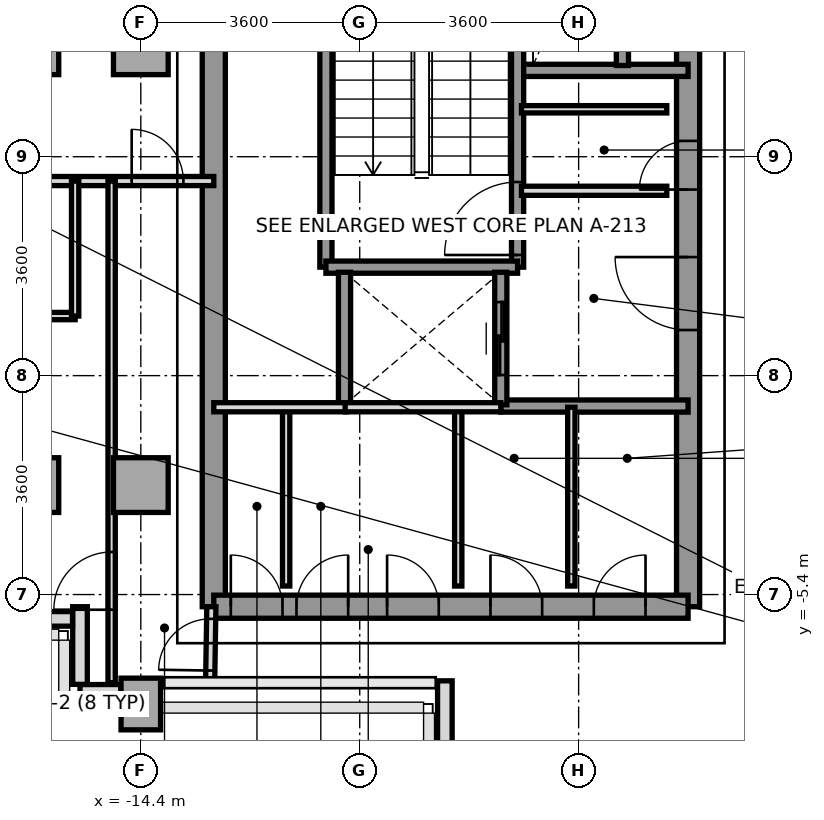
"""IFC4 building model, lengths in metres.
Left out: names, types, materials, properties, quantities, classifications, styles, units other than length and angle.
Written with IfcOpenShell. Run it as: python <this file> out.ifc"""

import sys

from ifc_helpers import new_model, si_unit, direction, frame, frame_2d, origin, origin_2d, place, context, subcontext, project, spatial, rectangle, extrude, source, transform, mapped, element, fill, save


model = new_model("IFC4")
c1 = context("Model", 3, precision=1e-05, world=origin(), true_north=direction((0.0, 1.0)))
c2 = subcontext(c1, "Body", "Model", "MODEL_VIEW")
j1 = project(units=[si_unit("LENGTHUNIT", "METRE"), si_unit("PLANEANGLEUNIT", "RADIAN")], contexts=[c1])
p1 = place(None, origin())
s1 = spatial("IfcSite", under=j1, at=p1, CompositionType="ELEMENT")
p2 = place(p1, origin())
s2 = spatial("IfcBuilding", under=s1, at=p2, CompositionType="ELEMENT")
p3 = place(p2, frame((0.0, 0.0, 187.6)))
s3 = spatial("IfcBuildingStorey", under=s2, at=p3, CompositionType="ELEMENT", Elevation=187.6)
m1 = source(origin(), c2, "Body", "SweptSolid", [
    extrude(rectangle(XDim=0.9, YDim=0.9, at=origin_2d()), origin(), (0.0, 0.0, 1.0), 3.2),
])
for number, where, z_axis, x_axis in (
    (1, (-16.2, -3.6, 0.0), (0.0, 0.0, 1.0), (1.0, 0.0, 0.0)),
    (2, (-16.2, 3.6, 0.0), (0.0, 0.0, 1.0), (1.0, 0.0, 0.0)),
):
    element("IfcColumn", number, at=place(p3, frame(where, z_axis=z_axis, x_axis=x_axis)), inside=s3, PredefinedType="COLUMN", context=c2, shape_type="MappedRepresentation", body=[
        mapped(m1, transform((0.0, 0.0, 0.0), x_axis=(1.0, 0.0, 0.0), y_axis=(0.0, 1.0, 0.0), z_axis=(0.0, 0.0, 1.0), scale=1.0)),
    ])
m2 = source(origin(), c2, "Body", "SweptSolid", [
    extrude(rectangle(XDim=0.65, YDim=0.85, at=origin_2d()), origin(), (0.0, 0.0, 1.0), 3.2),
])
p4 = place(p3, frame((-14.4, -7.2, 0.0), z_axis=(0.0, 0.0, 1.0), x_axis=(1.0, 0.0, 0.0)))
e3 = element("IfcColumn", 3, at=p4, inside=s3, PredefinedType="COLUMN", context=c2, shape_type="MappedRepresentation", body=[
    mapped(m2, transform((0.0, 0.0, 0.0), x_axis=(1.0, 0.0, 0.0), y_axis=(0.0, 1.0, 0.0), z_axis=(0.0, 0.0, 1.0), scale=1.0)),
])
for number, where, z_axis, x_axis in (
    (4, (-14.4, -3.6, 0.0), (0.0, 0.0, 1.0), (1.0, 0.0, 0.0)),
    (5, (-14.4, 3.6, 0.0), (0.0, 0.0, 1.0), (1.0, 0.0, 0.0)),
):
    element("IfcColumn", number, at=place(p3, frame(where, z_axis=z_axis, x_axis=x_axis)), inside=s3, PredefinedType="COLUMN", context=c2, shape_type="MappedRepresentation", body=[
        mapped(m1, transform((0.0, 0.0, 0.0), x_axis=(1.0, 0.0, 0.0), y_axis=(0.0, 1.0, 0.0), z_axis=(0.0, 0.0, 1.0), scale=1.0)),
    ])
p5 = place(p3, frame((-9.4, -8.547, 0.0), z_axis=(0.0, 0.0, 1.0), x_axis=(0.0, 1.0, 0.0)))
e6 = element("IfcWall", 6, at=p5, inside=s3, PredefinedType="PARAPET", context=c2, shape_type="SweptSolid", body=[
    extrude(rectangle(XDim=1.728, YDim=0.24, at=frame_2d((0.864, 0.0))), origin(), (0.0, 0.0, 1.0), 1.15),
])
p6 = place(p3, frame((-14.728, -7.0, 0.0), z_axis=(0.0, 0.0, 1.0), x_axis=(-1.0, 0.0, 0.0)))
e7 = element("IfcWall", 7, at=p6, inside=s3, PredefinedType="PARAPET", context=c2, shape_type="SweptSolid", body=[
    extrude(rectangle(XDim=0.672, YDim=0.24, at=frame_2d((0.336, 0.0))), origin(), (0.0, 0.0, 1.0), 1.15),
])
p7 = place(p3, frame((-15.4, -6.877, 0.0), z_axis=(0.0, 0.0, 1.0), x_axis=(0.0, 1.0, 0.0)))
e8 = element("IfcWall", 8, at=p7, inside=s3, PredefinedType="PARAPET", context=c2, shape_type="SweptSolid", body=[
    extrude(rectangle(XDim=1.277, YDim=0.24, at=frame_2d((0.638, 0.0))), origin(), (0.0, 0.0, 1.0), 1.15),
])
p8 = place(p3, frame((-15.523, -5.8, 0.0), z_axis=(0.0, 0.0, 1.0), x_axis=(-1.0, 0.0, 0.0)))
e9 = element("IfcWall", 9, at=p8, inside=s3, PredefinedType="PARAPET", context=c2, shape_type="SweptSolid", body=[
    extrude(rectangle(XDim=0.614, YDim=0.24, at=frame_2d((0.307, 0.0))), origin(), (0.0, 0.0, 1.0), 1.15),
])
p9 = place(p3, frame((-13.2, -5.6, 0.0), z_axis=(0.0, 0.0, 1.0), x_axis=(0.0, 1.0, 0.0)))
e10 = element("IfcWall", 10, at=p9, inside=s3, PredefinedType="SHEAR", context=c2, shape_type="SweptSolid", body=[
    extrude(rectangle(XDim=11.2, YDim=0.38, at=frame_2d((5.6, 0.0))), origin(), (0.0, 0.0, 1.0), 3.2),
])
p10 = place(p3, frame((-5.4, -5.6, 0.0), z_axis=(0.0, 0.0, 1.0), x_axis=(0.0, 1.0, 0.0)))
e11 = element("IfcWall", 11, at=p10, inside=s3, PredefinedType="SHEAR", context=c2, shape_type="SweptSolid", body=[
    extrude(rectangle(XDim=12.5, YDim=0.38, at=frame_2d((6.25, 0.0))), origin(), (0.0, 0.0, 1.0), 3.2),
])
p11 = place(p10, frame((4.55, 0.0, 0.0)))
e12 = element("IfcOpeningElement", 12, at=p11, cuts=e11, PredefinedType="OPENING", context=c2, shape_type="SweptSolid", body=[
    extrude(rectangle(XDim=1.2, YDim=2.2, at=frame_2d((0.6, 1.1))), frame((0.0, 0.2, 0.0), z_axis=(0.0, -1.0, 0.0), x_axis=(1.0, 0.0, 0.0)), (0.0, 0.0, 1.0), 0.4),
])
p12 = place(p10, frame((10.45, 0.0, 0.0)))
e13 = element("IfcOpeningElement", 13, at=p12, cuts=e11, PredefinedType="OPENING", context=c2, shape_type="SweptSolid", body=[
    extrude(rectangle(XDim=1.2, YDim=2.2, at=frame_2d((0.6, 1.1))), frame((0.0, 0.2, 0.0), z_axis=(0.0, -1.0, 0.0), x_axis=(1.0, 0.0, 0.0)), (0.0, 0.0, 1.0), 0.4),
])
p13 = place(p10, frame((6.86, 0.0, 0.0)))
e14 = element("IfcOpeningElement", 14, at=p13, cuts=e11, PredefinedType="OPENING", context=c2, shape_type="SweptSolid", body=[
    extrude(rectangle(XDim=0.8, YDim=2.1, at=frame_2d((0.4, 1.05))), frame((0.0, 0.2, 0.0), z_axis=(0.0, -1.0, 0.0), x_axis=(1.0, 0.0, 0.0)), (0.0, 0.0, 1.0), 0.4),
])
p14 = place(p3, frame((-13.2, -5.6, 0.0), z_axis=(0.0, 0.0, 1.0), x_axis=(1.0, 0.0, 0.0)))
e15 = element("IfcWall", 15, at=p14, inside=s3, PredefinedType="SHEAR", context=c2, shape_type="SweptSolid", body=[
    extrude(rectangle(XDim=7.8, YDim=0.38, at=frame_2d((3.9, 0.0))), origin(), (0.0, 0.0, 1.0), 3.2),
])
p15 = place(p14, frame((0.28, 0.0, 0.0)))
e16 = element("IfcOpeningElement", 16, at=p15, cuts=e15, PredefinedType="OPENING", context=c2, shape_type="SweptSolid", body=[
    extrude(rectangle(XDim=0.85, YDim=2.1, at=frame_2d((0.425, 1.05))), frame((0.0, 0.2, 0.0), z_axis=(0.0, -1.0, 0.0), x_axis=(1.0, 0.0, 0.0)), (0.0, 0.0, 1.0), 0.4),
])
p16 = place(p14, frame((1.36, 0.0, 0.0)))
e17 = element("IfcOpeningElement", 17, at=p16, cuts=e15, PredefinedType="OPENING", context=c2, shape_type="SweptSolid", body=[
    extrude(rectangle(XDim=0.85, YDim=2.1, at=frame_2d((0.425, 1.05))), frame((0.0, 0.2, 0.0), z_axis=(0.0, -1.0, 0.0), x_axis=(1.0, 0.0, 0.0)), (0.0, 0.0, 1.0), 0.4),
])
p17 = place(p14, frame((2.85, 0.0, 0.0)))
e18 = element("IfcOpeningElement", 18, at=p17, cuts=e15, PredefinedType="OPENING", context=c2, shape_type="SweptSolid", body=[
    extrude(rectangle(XDim=0.85, YDim=2.1, at=frame_2d((0.425, 1.05))), frame((0.0, 0.2, 0.0), z_axis=(0.0, -1.0, 0.0), x_axis=(1.0, 0.0, 0.0)), (0.0, 0.0, 1.0), 0.4),
])
p18 = place(p14, frame((4.55, 0.0, 0.0)))
e19 = element("IfcOpeningElement", 19, at=p18, cuts=e15, PredefinedType="OPENING", context=c2, shape_type="SweptSolid", body=[
    extrude(rectangle(XDim=0.85, YDim=2.1, at=frame_2d((0.425, 1.05))), frame((0.0, 0.2, 0.0), z_axis=(0.0, -1.0, 0.0), x_axis=(1.0, 0.0, 0.0)), (0.0, 0.0, 1.0), 0.4),
])
p19 = place(p14, frame((6.25, 0.0, 0.0)))
e20 = element("IfcOpeningElement", 20, at=p19, cuts=e15, PredefinedType="OPENING", context=c2, shape_type="SweptSolid", body=[
    extrude(rectangle(XDim=0.85, YDim=2.1, at=frame_2d((0.425, 1.05))), frame((0.0, 0.2, 0.0), z_axis=(0.0, -1.0, 0.0), x_axis=(1.0, 0.0, 0.0)), (0.0, 0.0, 1.0), 0.4),
])
p20 = place(p3, frame((-8.18, 3.22, 0.0), z_axis=(0.0, 0.0, 1.0), x_axis=(1.0, 0.0, 0.0)))
e21 = element("IfcWall", 21, at=p20, inside=s3, PredefinedType="SOLIDWALL", context=c2, shape_type="SweptSolid", body=[
    extrude(rectangle(XDim=2.78, YDim=0.2, at=frame_2d((1.39, 0.0))), origin(), (0.0, 0.0, 1.0), 3.2),
])
p21 = place(p3, frame((-8.48, -2.3, 0.0), z_axis=(0.0, 0.0, 1.0), x_axis=(1.0, 0.0, 0.0)))
e22 = element("IfcWall", 22, at=p21, inside=s3, PredefinedType="SOLIDWALL", context=c2, shape_type="SweptSolid", body=[
    extrude(rectangle(XDim=3.08, YDim=0.2, at=frame_2d((1.54, 0.0))), origin(), (0.0, 0.0, 1.0), 3.2),
])
p22 = place(p3, frame((-8.204, -0.016, 0.0), z_axis=(0.0, 0.0, 1.0), x_axis=(0.0, 1.0, 0.0)))
e23 = element("IfcWall", 23, at=p22, inside=s3, PredefinedType="SOLIDWALL", context=c2, shape_type="SweptSolid", body=[
    extrude(rectangle(XDim=6.916, YDim=0.2, at=frame_2d((3.458, 0.0))), origin(), (0.0, 0.0, 1.0), 3.2),
])
p23 = place(p22, frame((0.2, 0.0, 0.0)))
e24 = element("IfcOpeningElement", 24, at=p23, cuts=e23, PredefinedType="OPENING", context=c2, shape_type="SweptSolid", body=[
    extrude(rectangle(XDim=1.2, YDim=2.2, at=frame_2d((0.6, 1.1))), frame((0.0, 0.11, 0.0), z_axis=(0.0, -1.0, 0.0), x_axis=(1.0, 0.0, 0.0)), (0.0, 0.0, 1.0), 0.22),
])
p24 = place(p3, frame((-11.356, -0.016, 0.0), z_axis=(0.0, 0.0, 1.0), x_axis=(0.0, 1.0, 0.0)))
e25 = element("IfcWall", 25, at=p24, inside=s3, PredefinedType="SOLIDWALL", context=c2, shape_type="SweptSolid", body=[
    extrude(rectangle(XDim=6.916, YDim=0.2, at=frame_2d((3.458, 0.0))), origin(), (0.0, 0.0, 1.0), 3.2),
])
p25 = place(p3, frame((-11.356, -0.016, 0.0), z_axis=(0.0, 0.0, 1.0), x_axis=(1.0, 0.0, 0.0)))
e26 = element("IfcWall", 26, at=p25, inside=s3, PredefinedType="SOLIDWALL", context=c2, shape_type="SweptSolid", body=[
    extrude(rectangle(XDim=3.152, YDim=0.2, at=frame_2d((1.576, 0.0))), origin(), (0.0, 0.0, 1.0), 3.2),
])
p26 = place(p3, frame((-11.05, -2.28, 0.0), z_axis=(0.0, 0.0, 1.0), x_axis=(0.0, 1.0, 0.0)))
e27 = element("IfcWall", 27, at=p26, inside=s3, PredefinedType="SOLIDWALL", context=c2, shape_type="SweptSolid", body=[
    extrude(rectangle(XDim=2.18, YDim=0.2, at=frame_2d((1.09, 0.0))), origin(), (0.0, 0.0, 1.0), 3.2),
])
p27 = place(p3, frame((-8.48, -2.28, 0.0), z_axis=(0.0, 0.0, 1.0), x_axis=(0.0, 1.0, 0.0)))
e28 = element("IfcWall", 28, at=p27, inside=s3, PredefinedType="SOLIDWALL", context=c2, shape_type="SweptSolid", body=[
    extrude(rectangle(XDim=2.18, YDim=0.2, at=frame_2d((1.09, 0.0))), origin(), (0.0, 0.0, 1.0), 3.2),
])
p28 = place(p27, frame((0.49, 0.0, 0.0)))
e29 = element("IfcOpeningElement", 29, at=p28, cuts=e28, PredefinedType="OPENING", context=c2, shape_type="SweptSolid", body=[
    extrude(rectangle(XDim=1.2, YDim=2.2, at=frame_2d((0.6, 1.1))), frame((0.0, 0.11, 0.0), z_axis=(0.0, -1.0, 0.0), x_axis=(1.0, 0.0, 0.0)), (0.0, 0.0, 1.0), 0.22),
])
p29 = place(p3, frame((-6.48, 3.3, 0.0), z_axis=(0.0, 0.0, 1.0), x_axis=(0.0, 1.0, 0.0)))
e30 = element("IfcWall", 30, at=p29, inside=s3, PredefinedType="SOLIDWALL", context=c2, shape_type="SweptSolid", body=[
    extrude(rectangle(XDim=1.68, YDim=0.2, at=frame_2d((0.84, 0.0))), origin(), (0.0, 0.0, 1.0), 3.2),
])
p30 = place(p29, frame((0.29, 0.0, 0.0)))
e31 = element("IfcOpeningElement", 31, at=p30, cuts=e30, PredefinedType="OPENING", context=c2, shape_type="SweptSolid", body=[
    extrude(rectangle(XDim=1.1, YDim=2.2, at=frame_2d((0.55, 1.1))), frame((0.0, 0.11, 0.0), z_axis=(0.0, -1.0, 0.0), x_axis=(1.0, 0.0, 0.0)), (0.0, 0.0, 1.0), 0.22),
])
p31 = place(p3, frame((-8.14, 1.24, 0.0), z_axis=(0.0, 0.0, 1.0), x_axis=(1.0, 0.0, 0.0)))
e32 = element("IfcWall", 32, at=p31, inside=s3, PredefinedType="PARTITIONING", context=c2, shape_type="SweptSolid", body=[
    extrude(rectangle(XDim=2.39, YDim=0.15, at=frame_2d((1.195, 0.0))), origin(), (0.0, 0.0, 1.0), 2.3),
])
p32 = place(p3, frame((-8.14, 2.58, 0.0), z_axis=(0.0, 0.0, 1.0), x_axis=(1.0, 0.0, 0.0)))
e33 = element("IfcWall", 33, at=p32, inside=s3, PredefinedType="PARTITIONING", context=c2, shape_type="SweptSolid", body=[
    extrude(rectangle(XDim=2.39, YDim=0.12, at=frame_2d((1.195, 0.0))), origin(), (0.0, 0.0, 1.0), 2.3),
])
p33 = place(p3, frame((-12.01, -5.26, 0.0), z_axis=(0.0, 0.0, 1.0), x_axis=(0.0, 1.0, 0.0)))
e34 = element("IfcWall", 34, at=p33, inside=s3, PredefinedType="PARTITIONING", context=c2, shape_type="SweptSolid", body=[
    extrude(rectangle(XDim=2.94, YDim=0.12, at=frame_2d((1.47, 0.0))), origin(), (0.0, 0.0, 1.0), 3.2),
])
p34 = place(p3, frame((-13.2, -2.32, 0.0), z_axis=(0.0, 0.0, 1.0), x_axis=(1.0, 0.0, 0.0)))
e35 = element("IfcWall", 35, at=p34, inside=s3, PredefinedType="PARTITIONING", context=c2, shape_type="SweptSolid", body=[
    extrude(rectangle(XDim=2.18, YDim=0.15, at=frame_2d((1.09, 0.0))), origin(), (0.0, 0.0, 1.0), 3.2),
])
for number, where, z_axis, x_axis in (
    (36, (-9.18, -5.26, 0.0), (0.0, 0.0, 1.0), (0.0, 1.0, 0.0)),
    (37, (-7.32, -5.26, 0.0), (0.0, 0.0, 1.0), (0.0, 1.0, 0.0)),
):
    element("IfcWall", number, at=place(p3, frame(where, z_axis=z_axis, x_axis=x_axis)), inside=s3, PredefinedType="PARTITIONING", context=c2, shape_type="SweptSolid", body=[
        extrude(rectangle(XDim=2.94, YDim=0.12, at=frame_2d((1.47, 0.0))), origin(), (0.0, 0.0, 1.0), 3.2),
    ])
p35 = place(p3, frame((-11.04, -2.32, 0.0), z_axis=(0.0, 0.0, 1.0), x_axis=(1.0, 0.0, 0.0)))
e38 = element("IfcWall", 38, at=p35, inside=s3, PredefinedType="PARTITIONING", context=c2, shape_type="SweptSolid", body=[
    extrude(rectangle(XDim=2.56, YDim=0.15, at=frame_2d((1.28, 0.0))), origin(), (0.0, 0.0, 1.0), 3.2),
])
p36 = place(p3, frame((-13.26, -6.85, 0.0), z_axis=(0.0, 0.0, 1.0), x_axis=(0.016013571389, 0.999871774545, 0.0)))
e39 = element("IfcWall", 39, at=p36, inside=s3, PredefinedType="PARTITIONING", context=c2, shape_type="SweptSolid", body=[
    extrude(rectangle(XDim=1.25, YDim=0.15, at=frame_2d((0.625, 0.0))), origin(), (0.0, 0.0, 1.0), 3.2),
])
p37 = place(p36, frame((0.2, 0.0, 0.0)))
e40 = element("IfcOpeningElement", 40, at=p37, cuts=e39, PredefinedType="OPENING", context=c2, shape_type="SweptSolid", body=[
    extrude(rectangle(XDim=0.85, YDim=2.1, at=frame_2d((0.425, 1.05))), frame((0.0, 0.085, 0.0), z_axis=(0.0, -1.0, 0.0), x_axis=(1.0, 0.0, 0.0)), (0.0, 0.0, 1.0), 0.17),
])
p38 = place(p3, frame((-17.65, 1.4, 0.0), z_axis=(0.0, 0.0, 1.0), x_axis=(1.0, 0.0, 0.0)))
e41 = element("IfcWall", 41, at=p38, inside=s3, PredefinedType="PARTITIONING", context=c2, shape_type="SweptSolid", body=[
    extrude(rectangle(XDim=4.45, YDim=0.15, at=frame_2d((2.225, 0.0))), origin(), (0.0, 0.0, 1.0), 2.8),
])
p39 = place(p38, frame((3.1, 0.0, 0.0)))
e42 = element("IfcOpeningElement", 42, at=p39, cuts=e41, PredefinedType="OPENING", context=c2, shape_type="SweptSolid", body=[
    extrude(rectangle(XDim=0.85, YDim=2.1, at=frame_2d((0.425, 1.05))), frame((0.0, 0.085, 0.0), z_axis=(0.0, -1.0, 0.0), x_axis=(1.0, 0.0, 0.0)), (0.0, 0.0, 1.0), 0.17),
])
p40 = place(p3, frame((-14.88, -6.85, 0.0), z_axis=(0.0, 0.0, 1.0), x_axis=(0.0, 1.0, 0.0)))
e43 = element("IfcWall", 43, at=p40, inside=s3, PredefinedType="PARTITIONING", context=c2, shape_type="SweptSolid", body=[
    extrude(rectangle(XDim=8.25, YDim=0.12, at=frame_2d((4.125, 0.0))), origin(), (0.0, 0.0, 1.0), 3.2),
])
p41 = place(p40, frame((1.2, 0.0, 0.0)))
e44 = element("IfcOpeningElement", 44, at=p41, cuts=e43, PredefinedType="OPENING", context=c2, shape_type="SweptSolid", body=[
    extrude(rectangle(XDim=0.95, YDim=2.15, at=frame_2d((0.475, 1.075))), frame((0.0, 0.07, 0.0), z_axis=(0.0, -1.0, 0.0), x_axis=(1.0, 0.0, 0.0)), (0.0, 0.0, 1.0), 0.14),
])
p42 = place(p3, frame((-17.65, -0.82, 0.0), z_axis=(0.0, 0.0, 1.0), x_axis=(1.0, 0.0, 0.0)))
e45 = element("IfcWall", 45, at=p42, inside=s3, PredefinedType="PARTITIONING", context=c2, shape_type="SweptSolid", body=[
    extrude(rectangle(XDim=2.17, YDim=0.12, at=frame_2d((1.085, 0.0))), origin(), (0.0, 0.0, 1.0), 2.8),
])
p43 = place(p42, frame((0.3, 0.0, 0.0)))
e46 = element("IfcOpeningElement", 46, at=p43, cuts=e45, PredefinedType="OPENING", context=c2, shape_type="SweptSolid", body=[
    extrude(rectangle(XDim=0.85, YDim=2.1, at=frame_2d((0.425, 1.05))), frame((0.0, 0.07, 0.0), z_axis=(0.0, -1.0, 0.0), x_axis=(1.0, 0.0, 0.0)), (0.0, 0.0, 1.0), 0.14),
])
p44 = place(p3, frame((-15.48, -0.82, 0.0), z_axis=(0.0, 0.0, 1.0), x_axis=(0.0, 1.0, 0.0)))
e47 = element("IfcWall", 47, at=p44, inside=s3, PredefinedType="PARTITIONING", context=c2, shape_type="SweptSolid", body=[
    extrude(rectangle(XDim=2.22, YDim=0.12, at=frame_2d((1.11, 0.0))), origin(), (0.0, 0.0, 1.0), 3.2),
])
m3 = source(origin(), c2, "Body", "SweptSolid", [
    extrude(rectangle(XDim=1.2, YDim=2.2, at=frame_2d((0.6, 1.1))), frame((0.0, 0.025, 0.0), z_axis=(0.0, -1.0, 0.0), x_axis=(1.0, 0.0, 0.0)), (0.0, 0.0, 1.0), 0.05),
])
p45 = place(p23, origin())
e48 = element("IfcDoor", 48, at=p45, inside=s3, OperationType="SINGLE_SWING_LEFT", PredefinedType="DOOR", context=c2, shape_type="MappedRepresentation", body=[
    mapped(m3, transform((0.0, 0.0, 0.0), x_axis=(1.0, 0.0, 0.0), y_axis=(0.0, 1.0, 0.0), z_axis=(0.0, 0.0, 1.0), scale=1.0)),
])
fill(e24, e48)
p46 = place(p11, origin())
e49 = element("IfcDoor", 49, at=p46, inside=s3, OperationType="SINGLE_SWING_RIGHT", PredefinedType="DOOR", context=c2, shape_type="MappedRepresentation", body=[
    mapped(m3, transform((0.0, 0.0, 0.0), x_axis=(1.0, 0.0, 0.0), y_axis=(0.0, 1.0, 0.0), z_axis=(0.0, 0.0, 1.0), scale=1.0)),
])
fill(e12, e49)
m4 = source(origin(), c2, "Body", "SweptSolid", [
    extrude(rectangle(XDim=0.8, YDim=2.1, at=frame_2d((0.4, 1.05))), frame((0.0, 0.025, 0.0), z_axis=(0.0, -1.0, 0.0), x_axis=(1.0, 0.0, 0.0)), (0.0, 0.0, 1.0), 0.05),
])
p47 = place(p13, origin())
e50 = element("IfcDoor", 50, at=p47, inside=s3, OperationType="SINGLE_SWING_LEFT", PredefinedType="DOOR", context=c2, shape_type="MappedRepresentation", body=[
    mapped(m4, transform((0.0, 0.0, 0.0), x_axis=(1.0, 0.0, 0.0), y_axis=(0.0, 1.0, 0.0), z_axis=(0.0, 0.0, 1.0), scale=1.0)),
])
fill(e14, e50)
m5 = source(origin(), c2, "Body", "SweptSolid", [
    extrude(rectangle(XDim=0.85, YDim=2.1, at=frame_2d((0.425, 1.05))), frame((0.0, 0.025, 0.0), z_axis=(0.0, -1.0, 0.0), x_axis=(1.0, 0.0, 0.0)), (0.0, 0.0, 1.0), 0.05),
])
p48 = place(p15, origin())
e51 = element("IfcDoor", 51, at=p48, inside=s3, OperationType="SINGLE_SWING_LEFT", PredefinedType="DOOR", context=c2, shape_type="MappedRepresentation", body=[
    mapped(m5, transform((0.0, 0.0, 0.0), x_axis=(1.0, 0.0, 0.0), y_axis=(0.0, 1.0, 0.0), z_axis=(0.0, 0.0, 1.0), scale=1.0)),
])
fill(e16, e51)
p49 = place(p16, origin())
e52 = element("IfcDoor", 52, at=p49, inside=s3, OperationType="SINGLE_SWING_RIGHT", PredefinedType="DOOR", context=c2, shape_type="MappedRepresentation", body=[
    mapped(m5, transform((0.0, 0.0, 0.0), x_axis=(1.0, 0.0, 0.0), y_axis=(0.0, 1.0, 0.0), z_axis=(0.0, 0.0, 1.0), scale=1.0)),
])
fill(e17, e52)
p50 = place(p17, origin())
e53 = element("IfcDoor", 53, at=p50, inside=s3, OperationType="SINGLE_SWING_LEFT", PredefinedType="DOOR", context=c2, shape_type="MappedRepresentation", body=[
    mapped(m5, transform((0.0, 0.0, 0.0), x_axis=(1.0, 0.0, 0.0), y_axis=(0.0, 1.0, 0.0), z_axis=(0.0, 0.0, 1.0), scale=1.0)),
])
fill(e18, e53)
p51 = place(p18, origin())
e54 = element("IfcDoor", 54, at=p51, inside=s3, OperationType="SINGLE_SWING_LEFT", PredefinedType="DOOR", context=c2, shape_type="MappedRepresentation", body=[
    mapped(m5, transform((0.0, 0.0, 0.0), x_axis=(1.0, 0.0, 0.0), y_axis=(0.0, 1.0, 0.0), z_axis=(0.0, 0.0, 1.0), scale=1.0)),
])
fill(e19, e54)
p52 = place(p19, origin())
e55 = element("IfcDoor", 55, at=p52, inside=s3, OperationType="SINGLE_SWING_RIGHT", PredefinedType="DOOR", context=c2, shape_type="MappedRepresentation", body=[
    mapped(m5, transform((0.0, 0.0, 0.0), x_axis=(1.0, 0.0, 0.0), y_axis=(0.0, 1.0, 0.0), z_axis=(0.0, 0.0, 1.0), scale=1.0)),
])
fill(e20, e55)
p53 = place(p28, origin())
e56 = element("IfcDoor", 56, at=p53, inside=s3, OperationType="SLIDING_TO_RIGHT", PredefinedType="DOOR", context=c2, shape_type="MappedRepresentation", body=[
    mapped(m3, transform((0.0, 0.0, 0.0), x_axis=(1.0, 0.0, 0.0), y_axis=(0.0, 1.0, 0.0), z_axis=(0.0, 0.0, 1.0), scale=1.0)),
])
fill(e29, e56)
p54 = place(p37, origin())
e57 = element("IfcDoor", 57, at=p54, inside=s3, OperationType="SINGLE_SWING_LEFT", PredefinedType="DOOR", context=c2, shape_type="MappedRepresentation", body=[
    mapped(m5, transform((0.0, 0.0, 0.0), x_axis=(1.0, 0.0, 0.0), y_axis=(0.0, 1.0, 0.0), z_axis=(0.0, 0.0, 1.0), scale=1.0)),
])
fill(e40, e57)
m6 = source(origin(), c2, "Body", "SweptSolid", [
    extrude(rectangle(XDim=0.95, YDim=2.15, at=frame_2d((0.475, 1.075))), frame((0.0, 0.025, 0.0), z_axis=(0.0, -1.0, 0.0), x_axis=(1.0, 0.0, 0.0)), (0.0, 0.0, 1.0), 0.05),
])
p55 = place(p41, origin())
e58 = element("IfcDoor", 58, at=p55, inside=s3, OperationType="SINGLE_SWING_LEFT", PredefinedType="DOOR", context=c2, shape_type="MappedRepresentation", body=[
    mapped(m6, transform((0.0, 0.0, 0.0), x_axis=(1.0, 0.0, 0.0), y_axis=(0.0, 1.0, 0.0), z_axis=(0.0, 0.0, 1.0), scale=1.0)),
])
fill(e44, e58)
p56 = place(p39, origin())
e59 = element("IfcDoor", 59, at=p56, inside=s3, OperationType="SINGLE_SWING_LEFT", PredefinedType="DOOR", context=c2, shape_type="MappedRepresentation", body=[
    mapped(m5, transform((0.0, 0.0, 0.0), x_axis=(1.0, 0.0, 0.0), y_axis=(0.0, 1.0, 0.0), z_axis=(0.0, 0.0, 1.0), scale=1.0)),
])
fill(e42, e59)
save(model, sys.argv[1])
